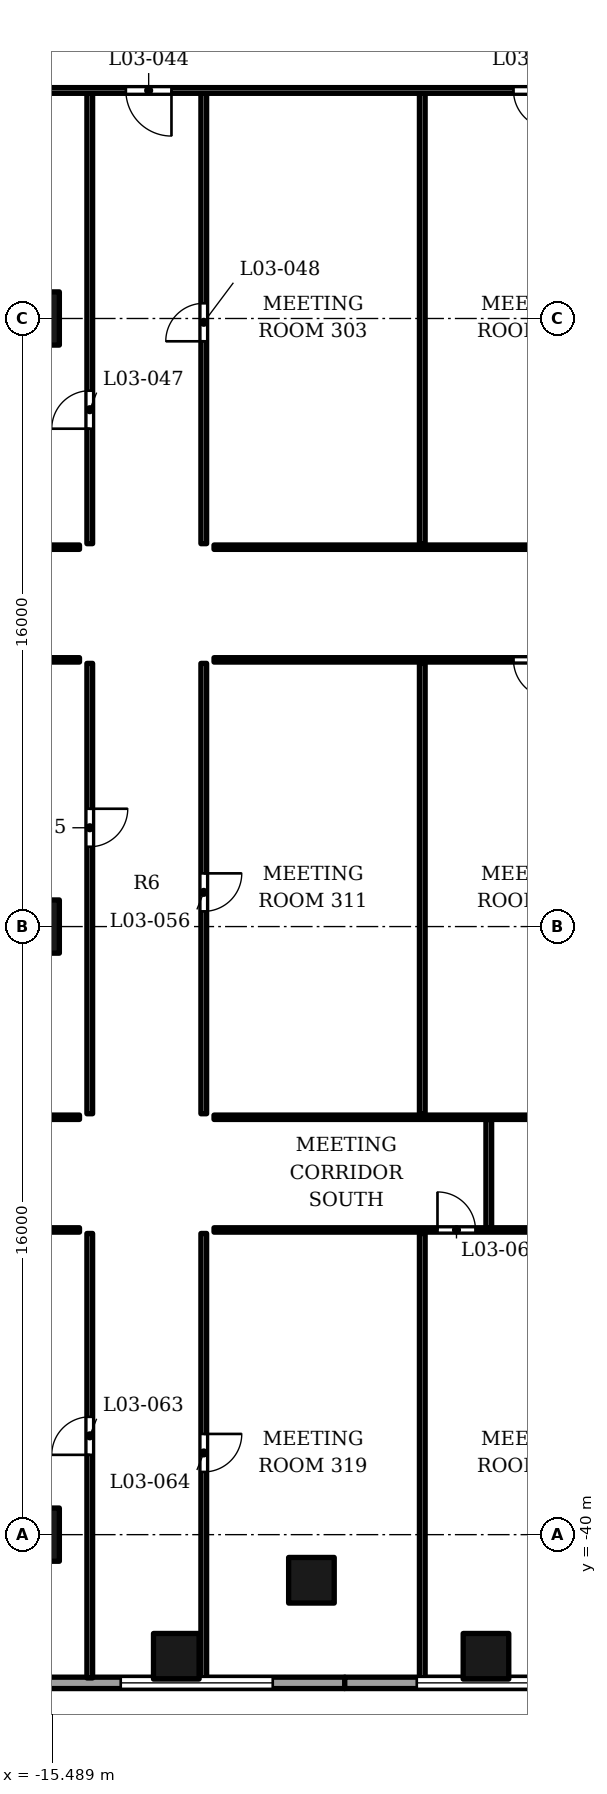
"""IFC4 building model, lengths in metres.
Left out: names, types, materials, properties, quantities, classifications, styles, units other than length and angle.
Written with IfcOpenShell. Run it as: python <this file> out.ifc"""

import sys

from ifc_helpers import new_model, si_unit, direction, frame, frame_2d, origin, origin_2d, place, context, subcontext, project, spatial, rectangle, extrude, element, fill, save


model = new_model("IFC4")
c1 = context("Model", 3, precision=1e-05, world=origin(), true_north=direction((0.0, 1.0)))
c2 = subcontext(c1, "Body", "Model", "MODEL_VIEW")
j1 = project(units=[si_unit("LENGTHUNIT", "METRE"), si_unit("PLANEANGLEUNIT", "RADIAN")], contexts=[c1])
p1 = place(None, origin())
s1 = spatial("IfcSite", under=j1, at=p1, CompositionType="ELEMENT")
p2 = place(p1, origin())
s2 = spatial("IfcBuilding", under=s1, at=p2, CompositionType="ELEMENT")
p3 = place(p2, frame((0.0, 0.0, 29.0)))
s3 = spatial("IfcBuildingStorey", under=s2, at=p3, CompositionType="ELEMENT", Elevation=29.0)
for number, where, z_axis, x_axis in (
    (1, (-16.0, -40.0, 0.0), (0.0, 0.0, 1.0), (1.0, 0.0, 0.0)),
    (2, (-16.0, -24.0, 0.0), (0.0, 0.0, 1.0), (1.0, 0.0, 0.0)),
    (3, (-16.0, -8.0, 0.0), (0.0, 0.0, 1.0), (1.0, 0.0, 0.0)),
):
    element("IfcColumn", number, at=place(p3, frame(where, z_axis=z_axis, x_axis=x_axis)), inside=s3, PredefinedType="COLUMN", context=c2, shape_type="SweptSolid", body=[
        extrude(rectangle(XDim=1.4, YDim=1.4, at=origin_2d()), origin(), (0.0, 0.0, 1.0), 5.5),
    ])
for number, where, z_axis, x_axis in (
    (4, (-8.667, -41.2, 0.0), (0.0, 0.0, 1.0), (1.0, 0.0, 0.0)),
    (5, (-4.074, -43.2, 0.0), (0.0, 0.0, 1.0), (1.0, 0.0, 0.0)),
    (6, (-12.223, -43.2, 0.0), (0.0, 0.0, 1.0), (1.0, 0.0, 0.0)),
):
    element("IfcColumn", number, at=place(p3, frame(where, z_axis=z_axis, x_axis=x_axis)), inside=s3, PredefinedType="COLUMN", context=c2, shape_type="SweptSolid", body=[
        extrude(rectangle(XDim=1.2, YDim=1.2, at=origin_2d()), origin(), (0.0, 0.0, 1.0), 5.5),
    ])
p4 = place(p3, frame((-15.58, -43.9, 0.0), z_axis=(0.0, 0.0, 1.0), x_axis=(1.0, 0.0, 0.0)))
e7 = element("IfcWall", 7, at=p4, inside=s3, PredefinedType="SOLIDWALL", context=c2, shape_type="SweptSolid", body=[
    extrude(rectangle(XDim=7.79, YDim=0.3, at=frame_2d((3.895, 0.0))), origin(), (0.0, 0.0, 1.0), 4.1),
])
p5 = place(p4, frame((1.895, 0.0, 1.0)))
e8 = element("IfcOpeningElement", 8, at=p5, cuts=e7, PredefinedType="OPENING", context=c2, shape_type="SweptSolid", body=[
    extrude(rectangle(XDim=4.0, YDim=1.8, at=frame_2d((2.0, 0.9))), frame((0.0, 0.16, 0.0), z_axis=(0.0, -1.0, 0.0), x_axis=(1.0, 0.0, 0.0)), (0.0, 0.0, 1.0), 0.32),
])
p6 = place(p3, frame((-7.79, -43.9, 0.0), z_axis=(0.0, 0.0, 1.0), x_axis=(1.0, 0.0, 0.0)))
e9 = element("IfcWall", 9, at=p6, inside=s3, PredefinedType="SOLIDWALL", context=c2, shape_type="SweptSolid", body=[
    extrude(rectangle(XDim=7.79, YDim=0.3, at=frame_2d((3.895, 0.0))), origin(), (0.0, 0.0, 1.0), 4.1),
])
p7 = place(p6, frame((1.895, 0.0, 1.0)))
e10 = element("IfcOpeningElement", 10, at=p7, cuts=e9, PredefinedType="OPENING", context=c2, shape_type="SweptSolid", body=[
    extrude(rectangle(XDim=4.0, YDim=1.8, at=frame_2d((2.0, 0.9))), frame((0.0, 0.16, 0.0), z_axis=(0.0, -1.0, 0.0), x_axis=(1.0, 0.0, 0.0)), (0.0, 0.0, 1.0), 0.32),
])
p8 = place(p3, frame((-14.5, -43.77, 0.0), z_axis=(0.0, 0.0, 1.0), x_axis=(0.0, 1.0, 0.0)))
e11 = element("IfcWall", 11, at=p8, inside=s3, PredefinedType="PARTITIONING", context=c2, shape_type="SweptSolid", body=[
    extrude(rectangle(XDim=11.695, YDim=0.15, at=frame_2d((5.848, 0.0))), origin(), (0.0, 0.0, 1.0), 3.85),
])
p9 = place(p8, frame((5.87, 0.0, 0.0)))
e12 = element("IfcOpeningElement", 12, at=p9, cuts=e11, PredefinedType="OPENING", context=c2, shape_type="SweptSolid", body=[
    extrude(rectangle(XDim=1.0, YDim=2.1, at=frame_2d((0.5, 1.05))), frame((0.0, 0.085, 0.0), z_axis=(0.0, -1.0, 0.0), x_axis=(1.0, 0.0, 0.0)), (0.0, 0.0, 1.0), 0.17),
])
p10 = place(p3, frame((-11.5, -43.77, 0.0), z_axis=(0.0, 0.0, 1.0), x_axis=(0.0, 1.0, 0.0)))
e13 = element("IfcWall", 13, at=p10, inside=s3, PredefinedType="PARTITIONING", context=c2, shape_type="SweptSolid", body=[
    extrude(rectangle(XDim=11.695, YDim=0.15, at=frame_2d((5.848, 0.0))), origin(), (0.0, 0.0, 1.0), 3.85),
])
p11 = place(p10, frame((5.42, 0.0, 0.0)))
e14 = element("IfcOpeningElement", 14, at=p11, cuts=e13, PredefinedType="OPENING", context=c2, shape_type="SweptSolid", body=[
    extrude(rectangle(XDim=1.0, YDim=2.1, at=frame_2d((0.5, 1.05))), frame((0.0, 0.085, 0.0), z_axis=(0.0, -1.0, 0.0), x_axis=(1.0, 0.0, 0.0)), (0.0, 0.0, 1.0), 0.17),
])
p12 = place(p3, frame((-5.75, -43.77, 0.0), z_axis=(0.0, 0.0, 1.0), x_axis=(0.0, 1.0, 0.0)))
e15 = element("IfcWall", 15, at=p12, inside=s3, PredefinedType="PARTITIONING", context=c2, shape_type="SweptSolid", body=[
    extrude(rectangle(XDim=11.695, YDim=0.15, at=frame_2d((5.848, 0.0))), origin(), (0.0, 0.0, 1.0), 3.85),
])
p13 = place(p3, frame((-33.46, -31.982, 0.0), z_axis=(0.0, 0.0, 1.0), x_axis=(1.0, 0.0, 0.0)))
e16 = element("IfcWall", 16, at=p13, inside=s3, PredefinedType="PARTITIONING", context=c2, shape_type="SweptSolid", body=[
    extrude(rectangle(XDim=18.69, YDim=0.115, at=frame_2d((9.345, 0.0))), origin(), (0.0, 0.0, 1.0), 3.85),
])
p14 = place(p13, frame((4.06, 0.0, 0.0)))
e17 = element("IfcOpeningElement", 17, at=p14, cuts=e16, PredefinedType="OPENING", context=c2, shape_type="SweptSolid", body=[
    extrude(rectangle(XDim=1.0, YDim=2.1, at=frame_2d((0.5, 1.05))), frame((0.0, 0.067, 0.0), z_axis=(0.0, -1.0, 0.0), x_axis=(1.0, 0.0, 0.0)), (0.0, 0.0, 1.0), 0.135),
])
p15 = place(p3, frame((-11.23, -31.982, 0.0), z_axis=(0.0, 0.0, 1.0), x_axis=(1.0, 0.0, 0.0)))
e18 = element("IfcWall", 18, at=p15, inside=s3, PredefinedType="PARTITIONING", context=c2, shape_type="SweptSolid", body=[
    extrude(rectangle(XDim=22.46, YDim=0.115, at=frame_2d((11.23, 0.0))), origin(), (0.0, 0.0, 1.0), 3.85),
])
p16 = place(p15, frame((5.88, 0.0, 0.0)))
e19 = element("IfcOpeningElement", 19, at=p16, cuts=e18, PredefinedType="OPENING", context=c2, shape_type="SweptSolid", body=[
    extrude(rectangle(XDim=1.0, YDim=2.1, at=frame_2d((0.5, 1.05))), frame((0.0, 0.067, 0.0), z_axis=(0.0, -1.0, 0.0), x_axis=(1.0, 0.0, 0.0)), (0.0, 0.0, 1.0), 0.135),
])
p17 = place(p15, frame((15.63, 0.0, 0.0)))
e20 = element("IfcOpeningElement", 20, at=p17, cuts=e18, PredefinedType="OPENING", context=c2, shape_type="SweptSolid", body=[
    extrude(rectangle(XDim=1.0, YDim=2.1, at=frame_2d((0.5, 1.05))), frame((0.0, 0.067, 0.0), z_axis=(0.0, -1.0, 0.0), x_axis=(1.0, 0.0, 0.0)), (0.0, 0.0, 1.0), 0.135),
])
p18 = place(p3, frame((-4.0, -31.925, 0.0), z_axis=(0.0, 0.0, 1.0), x_axis=(0.0, 1.0, 0.0)))
e21 = element("IfcWall", 21, at=p18, inside=s3, PredefinedType="PARTITIONING", context=c2, shape_type="SweptSolid", body=[
    extrude(rectangle(XDim=2.85, YDim=0.15, at=frame_2d((1.425, 0.0))), origin(), (0.0, 0.0, 1.0), 5.05),
])
p19 = place(p3, frame((-33.46, -29.018, 0.0), z_axis=(0.0, 0.0, 1.0), x_axis=(1.0, 0.0, 0.0)))
e22 = element("IfcWall", 22, at=p19, inside=s3, PredefinedType="PARTITIONING", context=c2, shape_type="SweptSolid", body=[
    extrude(rectangle(XDim=18.69, YDim=0.115, at=frame_2d((9.345, 0.0))), origin(), (0.0, 0.0, 1.0), 3.85),
])
p20 = place(p3, frame((-11.23, -29.018, 0.0), z_axis=(0.0, 0.0, 1.0), x_axis=(1.0, 0.0, 0.0)))
e23 = element("IfcWall", 23, at=p20, inside=s3, PredefinedType="PARTITIONING", context=c2, shape_type="SweptSolid", body=[
    extrude(rectangle(XDim=9.63, YDim=0.115, at=frame_2d((4.815, 0.0))), origin(), (0.0, 0.0, 1.0), 4.15),
])
p21 = place(p3, frame((-14.5, -28.925, 0.0), z_axis=(0.0, 0.0, 1.0), x_axis=(0.0, 1.0, 0.0)))
e24 = element("IfcWall", 24, at=p21, inside=s3, PredefinedType="PARTITIONING", context=c2, shape_type="SweptSolid", body=[
    extrude(rectangle(XDim=11.85, YDim=0.15, at=frame_2d((5.925, 0.0))), origin(), (0.0, 0.0, 1.0), 3.85),
])
p22 = place(p21, frame((7.025, 0.0, 0.0)))
e25 = element("IfcOpeningElement", 25, at=p22, cuts=e24, PredefinedType="OPENING", context=c2, shape_type="SweptSolid", body=[
    extrude(rectangle(XDim=1.0, YDim=2.1, at=frame_2d((0.5, 1.05))), frame((0.0, 0.085, 0.0), z_axis=(0.0, -1.0, 0.0), x_axis=(1.0, 0.0, 0.0)), (0.0, 0.0, 1.0), 0.17),
])
p23 = place(p3, frame((-11.5, -28.925, 0.0), z_axis=(0.0, 0.0, 1.0), x_axis=(0.0, 1.0, 0.0)))
e26 = element("IfcWall", 26, at=p23, inside=s3, PredefinedType="PARTITIONING", context=c2, shape_type="SweptSolid", body=[
    extrude(rectangle(XDim=11.85, YDim=0.15, at=frame_2d((5.925, 0.0))), origin(), (0.0, 0.0, 1.0), 3.85),
])
p24 = place(p23, frame((5.325, 0.0, 0.0)))
e27 = element("IfcOpeningElement", 27, at=p24, cuts=e26, PredefinedType="OPENING", context=c2, shape_type="SweptSolid", body=[
    extrude(rectangle(XDim=1.0, YDim=2.1, at=frame_2d((0.5, 1.05))), frame((0.0, 0.085, 0.0), z_axis=(0.0, -1.0, 0.0), x_axis=(1.0, 0.0, 0.0)), (0.0, 0.0, 1.0), 0.17),
])
p25 = place(p3, frame((-5.75, -28.925, 0.0), z_axis=(0.0, 0.0, 1.0), x_axis=(0.0, 1.0, 0.0)))
e28 = element("IfcWall", 28, at=p25, inside=s3, PredefinedType="PARTITIONING", context=c2, shape_type="SweptSolid", body=[
    extrude(rectangle(XDim=11.85, YDim=0.15, at=frame_2d((5.925, 0.0))), origin(), (0.0, 0.0, 1.0), 3.85),
])
p26 = place(p3, frame((-33.675, -16.982, 0.0), z_axis=(0.0, 0.0, 1.0), x_axis=(1.0, 0.0, 0.0)))
e29 = element("IfcWall", 29, at=p26, inside=s3, PredefinedType="PARTITIONING", context=c2, shape_type="SweptSolid", body=[
    extrude(rectangle(XDim=18.905, YDim=0.115, at=frame_2d((9.453, 0.0))), origin(), (0.0, 0.0, 1.0), 3.85),
])
p27 = place(p26, frame((4.275, 0.0, 0.0)))
e30 = element("IfcOpeningElement", 30, at=p27, cuts=e29, PredefinedType="OPENING", context=c2, shape_type="SweptSolid", body=[
    extrude(rectangle(XDim=1.0, YDim=2.1, at=frame_2d((0.5, 1.05))), frame((0.0, 0.067, 0.0), z_axis=(0.0, -1.0, 0.0), x_axis=(1.0, 0.0, 0.0)), (0.0, 0.0, 1.0), 0.135),
])
p28 = place(p3, frame((-11.23, -16.982, 0.0), z_axis=(0.0, 0.0, 1.0), x_axis=(1.0, 0.0, 0.0)))
e31 = element("IfcWall", 31, at=p28, inside=s3, PredefinedType="PARTITIONING", context=c2, shape_type="SweptSolid", body=[
    extrude(rectangle(XDim=22.46, YDim=0.115, at=frame_2d((11.23, 0.0))), origin(), (0.0, 0.0, 1.0), 3.85),
])
p29 = place(p28, frame((7.88, 0.0, 0.0)))
e32 = element("IfcOpeningElement", 32, at=p29, cuts=e31, PredefinedType="OPENING", context=c2, shape_type="SweptSolid", body=[
    extrude(rectangle(XDim=1.0, YDim=2.1, at=frame_2d((0.5, 1.05))), frame((0.0, 0.067, 0.0), z_axis=(0.0, -1.0, 0.0), x_axis=(1.0, 0.0, 0.0)), (0.0, 0.0, 1.0), 0.135),
])
p30 = place(p28, frame((13.63, 0.0, 0.0)))
e33 = element("IfcOpeningElement", 33, at=p30, cuts=e31, PredefinedType="OPENING", context=c2, shape_type="SweptSolid", body=[
    extrude(rectangle(XDim=1.0, YDim=2.1, at=frame_2d((0.5, 1.05))), frame((0.0, 0.067, 0.0), z_axis=(0.0, -1.0, 0.0), x_axis=(1.0, 0.0, 0.0)), (0.0, 0.0, 1.0), 0.135),
])
p31 = place(p3, frame((-33.675, -14.018, 0.0), z_axis=(0.0, 0.0, 1.0), x_axis=(1.0, 0.0, 0.0)))
e34 = element("IfcWall", 34, at=p31, inside=s3, PredefinedType="PARTITIONING", context=c2, shape_type="SweptSolid", body=[
    extrude(rectangle(XDim=18.905, YDim=0.115, at=frame_2d((9.453, 0.0))), origin(), (0.0, 0.0, 1.0), 3.85),
])
p32 = place(p31, frame((4.425, 0.0, 0.0)))
e35 = element("IfcOpeningElement", 35, at=p32, cuts=e34, PredefinedType="OPENING", context=c2, shape_type="SweptSolid", body=[
    extrude(rectangle(XDim=1.0, YDim=2.1, at=frame_2d((0.5, 1.05))), frame((0.0, 0.067, 0.0), z_axis=(0.0, -1.0, 0.0), x_axis=(1.0, 0.0, 0.0)), (0.0, 0.0, 1.0), 0.135),
])
p33 = place(p3, frame((-11.23, -14.018, 0.0), z_axis=(0.0, 0.0, 1.0), x_axis=(1.0, 0.0, 0.0)))
e36 = element("IfcWall", 36, at=p33, inside=s3, PredefinedType="PARTITIONING", context=c2, shape_type="SweptSolid", body=[
    extrude(rectangle(XDim=22.46, YDim=0.115, at=frame_2d((11.23, 0.0))), origin(), (0.0, 0.0, 1.0), 3.85),
])
p34 = place(p3, frame((-14.5, -13.925, 0.0), z_axis=(0.0, 0.0, 1.0), x_axis=(0.0, 1.0, 0.0)))
e37 = element("IfcWall", 37, at=p34, inside=s3, PredefinedType="PARTITIONING", context=c2, shape_type="SweptSolid", body=[
    extrude(rectangle(XDim=11.85, YDim=0.15, at=frame_2d((5.925, 0.0))), origin(), (0.0, 0.0, 1.0), 3.85),
])
p35 = place(p34, frame((3.025, 0.0, 0.0)))
e38 = element("IfcOpeningElement", 38, at=p35, cuts=e37, PredefinedType="OPENING", context=c2, shape_type="SweptSolid", body=[
    extrude(rectangle(XDim=1.0, YDim=2.1, at=frame_2d((0.5, 1.05))), frame((0.0, 0.085, 0.0), z_axis=(0.0, -1.0, 0.0), x_axis=(1.0, 0.0, 0.0)), (0.0, 0.0, 1.0), 0.17),
])
p36 = place(p3, frame((-11.5, -13.925, 0.0), z_axis=(0.0, 0.0, 1.0), x_axis=(0.0, 1.0, 0.0)))
e39 = element("IfcWall", 39, at=p36, inside=s3, PredefinedType="PARTITIONING", context=c2, shape_type="SweptSolid", body=[
    extrude(rectangle(XDim=11.85, YDim=0.15, at=frame_2d((5.925, 0.0))), origin(), (0.0, 0.0, 1.0), 3.85),
])
p37 = place(p36, frame((5.325, 0.0, 0.0)))
e40 = element("IfcOpeningElement", 40, at=p37, cuts=e39, PredefinedType="OPENING", context=c2, shape_type="SweptSolid", body=[
    extrude(rectangle(XDim=1.0, YDim=2.1, at=frame_2d((0.5, 1.05))), frame((0.0, 0.085, 0.0), z_axis=(0.0, -1.0, 0.0), x_axis=(1.0, 0.0, 0.0)), (0.0, 0.0, 1.0), 0.17),
])
p38 = place(p3, frame((-5.75, -13.925, 0.0), z_axis=(0.0, 0.0, 1.0), x_axis=(0.0, 1.0, 0.0)))
e41 = element("IfcWall", 41, at=p38, inside=s3, PredefinedType="PARTITIONING", context=c2, shape_type="SweptSolid", body=[
    extrude(rectangle(XDim=11.85, YDim=0.15, at=frame_2d((5.925, 0.0))), origin(), (0.0, 0.0, 1.0), 3.85),
])
p39 = place(p3, frame((-33.46, -2.0, 0.0), z_axis=(0.0, 0.0, 1.0), x_axis=(1.0, 0.0, 0.0)))
e42 = element("IfcWall", 42, at=p39, inside=s3, PredefinedType="PARTITIONING", context=c2, shape_type="SweptSolid", body=[
    extrude(rectangle(XDim=66.92, YDim=0.15, at=frame_2d((33.46, 0.0))), origin(), (0.0, 0.0, 1.0), 3.85),
])
p40 = place(p39, frame((19.91, 0.0, 0.0)))
e43 = element("IfcOpeningElement", 43, at=p40, cuts=e42, PredefinedType="OPENING", context=c2, shape_type="SweptSolid", body=[
    extrude(rectangle(XDim=1.2, YDim=2.1, at=frame_2d((0.6, 1.05))), frame((0.0, 0.085, 0.0), z_axis=(0.0, -1.0, 0.0), x_axis=(1.0, 0.0, 0.0)), (0.0, 0.0, 1.0), 0.17),
])
p41 = place(p39, frame((45.91, 0.0, 0.0)))
e44 = element("IfcOpeningElement", 44, at=p41, cuts=e42, PredefinedType="OPENING", context=c2, shape_type="SweptSolid", body=[
    extrude(rectangle(XDim=1.2, YDim=2.1, at=frame_2d((0.6, 1.05))), frame((0.0, 0.085, 0.0), z_axis=(0.0, -1.0, 0.0), x_axis=(1.0, 0.0, 0.0)), (0.0, 0.0, 1.0), 0.17),
])
p42 = place(p39, frame((30.11, 0.0, 0.0)))
e45 = element("IfcOpeningElement", 45, at=p42, cuts=e42, PredefinedType="OPENING", context=c2, shape_type="SweptSolid", body=[
    extrude(rectangle(XDim=1.0, YDim=2.1, at=frame_2d((0.5, 1.05))), frame((0.0, 0.085, 0.0), z_axis=(0.0, -1.0, 0.0), x_axis=(1.0, 0.0, 0.0)), (0.0, 0.0, 1.0), 0.17),
])
p43 = place(p39, frame((35.86, 0.0, 0.0)))
e46 = element("IfcOpeningElement", 46, at=p43, cuts=e42, PredefinedType="OPENING", context=c2, shape_type="SweptSolid", body=[
    extrude(rectangle(XDim=1.0, YDim=2.1, at=frame_2d((0.5, 1.05))), frame((0.0, 0.085, 0.0), z_axis=(0.0, -1.0, 0.0), x_axis=(1.0, 0.0, 0.0)), (0.0, 0.0, 1.0), 0.17),
])
p44 = place(p5, origin())
e47 = element("IfcWindow", 47, at=p44, inside=s3, PartitioningType="SINGLE_PANEL", PredefinedType="WINDOW", context=c2, shape_type="SweptSolid", body=[
    extrude(rectangle(XDim=4.0, YDim=1.8, at=frame_2d((2.0, 0.9))), frame((0.0, 0.03, 0.0), z_axis=(0.0, -1.0, 0.0), x_axis=(1.0, 0.0, 0.0)), (0.0, 0.0, 1.0), 0.06),
])
fill(e8, e47)
p45 = place(p7, origin())
e48 = element("IfcWindow", 48, at=p45, inside=s3, PartitioningType="SINGLE_PANEL", PredefinedType="WINDOW", context=c2, shape_type="SweptSolid", body=[
    extrude(rectangle(XDim=4.0, YDim=1.8, at=frame_2d((2.0, 0.9))), frame((0.0, 0.03, 0.0), z_axis=(0.0, -1.0, 0.0), x_axis=(1.0, 0.0, 0.0)), (0.0, 0.0, 1.0), 0.06),
])
fill(e10, e48)
p46 = place(p40, origin())
e49 = element("IfcDoor", 49, at=p46, inside=s3, OperationType="SINGLE_SWING_RIGHT", PredefinedType="DOOR", context=c2, shape_type="SweptSolid", body=[
    extrude(rectangle(XDim=1.2, YDim=2.1, at=frame_2d((0.6, 1.05))), frame((0.0, 0.025, 0.0), z_axis=(0.0, -1.0, 0.0), x_axis=(1.0, 0.0, 0.0)), (0.0, 0.0, 1.0), 0.05),
])
fill(e43, e49)
p47 = place(p35, origin())
e50 = element("IfcDoor", 50, at=p47, inside=s3, OperationType="SINGLE_SWING_LEFT", PredefinedType="DOOR", context=c2, shape_type="SweptSolid", body=[
    extrude(rectangle(XDim=1.0, YDim=2.1, at=frame_2d((0.5, 1.05))), frame((0.0, 0.025, 0.0), z_axis=(0.0, -1.0, 0.0), x_axis=(1.0, 0.0, 0.0)), (0.0, 0.0, 1.0), 0.05),
])
fill(e38, e50)
p48 = place(p37, origin())
e51 = element("IfcDoor", 51, at=p48, inside=s3, OperationType="SINGLE_SWING_LEFT", PredefinedType="DOOR", context=c2, shape_type="SweptSolid", body=[
    extrude(rectangle(XDim=1.0, YDim=2.1, at=frame_2d((0.5, 1.05))), frame((0.0, 0.025, 0.0), z_axis=(0.0, -1.0, 0.0), x_axis=(1.0, 0.0, 0.0)), (0.0, 0.0, 1.0), 0.05),
])
fill(e40, e51)
p49 = place(p42, origin())
e52 = element("IfcDoor", 52, at=p49, inside=s3, OperationType="SINGLE_SWING_RIGHT", PredefinedType="DOOR", context=c2, shape_type="SweptSolid", body=[
    extrude(rectangle(XDim=1.0, YDim=2.1, at=frame_2d((0.5, 1.05))), frame((0.0, 0.025, 0.0), z_axis=(0.0, -1.0, 0.0), x_axis=(1.0, 0.0, 0.0)), (0.0, 0.0, 1.0), 0.05),
])
fill(e45, e52)
p50 = place(p22, origin())
e53 = element("IfcDoor", 53, at=p50, inside=s3, OperationType="SINGLE_SWING_RIGHT", PredefinedType="DOOR", context=c2, shape_type="SweptSolid", body=[
    extrude(rectangle(XDim=1.0, YDim=2.1, at=frame_2d((0.5, 1.05))), frame((0.0, 0.025, 0.0), z_axis=(0.0, -1.0, 0.0), x_axis=(1.0, 0.0, 0.0)), (0.0, 0.0, 1.0), 0.05),
])
fill(e25, e53)
p51 = place(p24, origin())
e54 = element("IfcDoor", 54, at=p51, inside=s3, OperationType="SINGLE_SWING_RIGHT", PredefinedType="DOOR", context=c2, shape_type="SweptSolid", body=[
    extrude(rectangle(XDim=1.0, YDim=2.1, at=frame_2d((0.5, 1.05))), frame((0.0, 0.025, 0.0), z_axis=(0.0, -1.0, 0.0), x_axis=(1.0, 0.0, 0.0)), (0.0, 0.0, 1.0), 0.05),
])
fill(e27, e54)
p52 = place(p29, origin())
e55 = element("IfcDoor", 55, at=p52, inside=s3, OperationType="SINGLE_SWING_RIGHT", PredefinedType="DOOR", context=c2, shape_type="SweptSolid", body=[
    extrude(rectangle(XDim=1.0, YDim=2.1, at=frame_2d((0.5, 1.05))), frame((0.0, 0.025, 0.0), z_axis=(0.0, -1.0, 0.0), x_axis=(1.0, 0.0, 0.0)), (0.0, 0.0, 1.0), 0.05),
])
fill(e32, e55)
p53 = place(p9, origin())
e56 = element("IfcDoor", 56, at=p53, inside=s3, OperationType="SINGLE_SWING_LEFT", PredefinedType="DOOR", context=c2, shape_type="SweptSolid", body=[
    extrude(rectangle(XDim=1.0, YDim=2.1, at=frame_2d((0.5, 1.05))), frame((0.0, 0.025, 0.0), z_axis=(0.0, -1.0, 0.0), x_axis=(1.0, 0.0, 0.0)), (0.0, 0.0, 1.0), 0.05),
])
fill(e12, e56)
p54 = place(p11, origin())
e57 = element("IfcDoor", 57, at=p54, inside=s3, OperationType="SINGLE_SWING_RIGHT", PredefinedType="DOOR", context=c2, shape_type="SweptSolid", body=[
    extrude(rectangle(XDim=1.0, YDim=2.1, at=frame_2d((0.5, 1.05))), frame((0.0, 0.025, 0.0), z_axis=(0.0, -1.0, 0.0), x_axis=(1.0, 0.0, 0.0)), (0.0, 0.0, 1.0), 0.05),
])
fill(e14, e57)
p55 = place(p16, origin())
e58 = element("IfcDoor", 58, at=p55, inside=s3, OperationType="SINGLE_SWING_LEFT", PredefinedType="DOOR", context=c2, shape_type="SweptSolid", body=[
    extrude(rectangle(XDim=1.0, YDim=2.1, at=frame_2d((0.5, 1.05))), frame((0.0, 0.025, 0.0), z_axis=(0.0, -1.0, 0.0), x_axis=(1.0, 0.0, 0.0)), (0.0, 0.0, 1.0), 0.05),
])
fill(e19, e58)
save(model, sys.argv[1])
